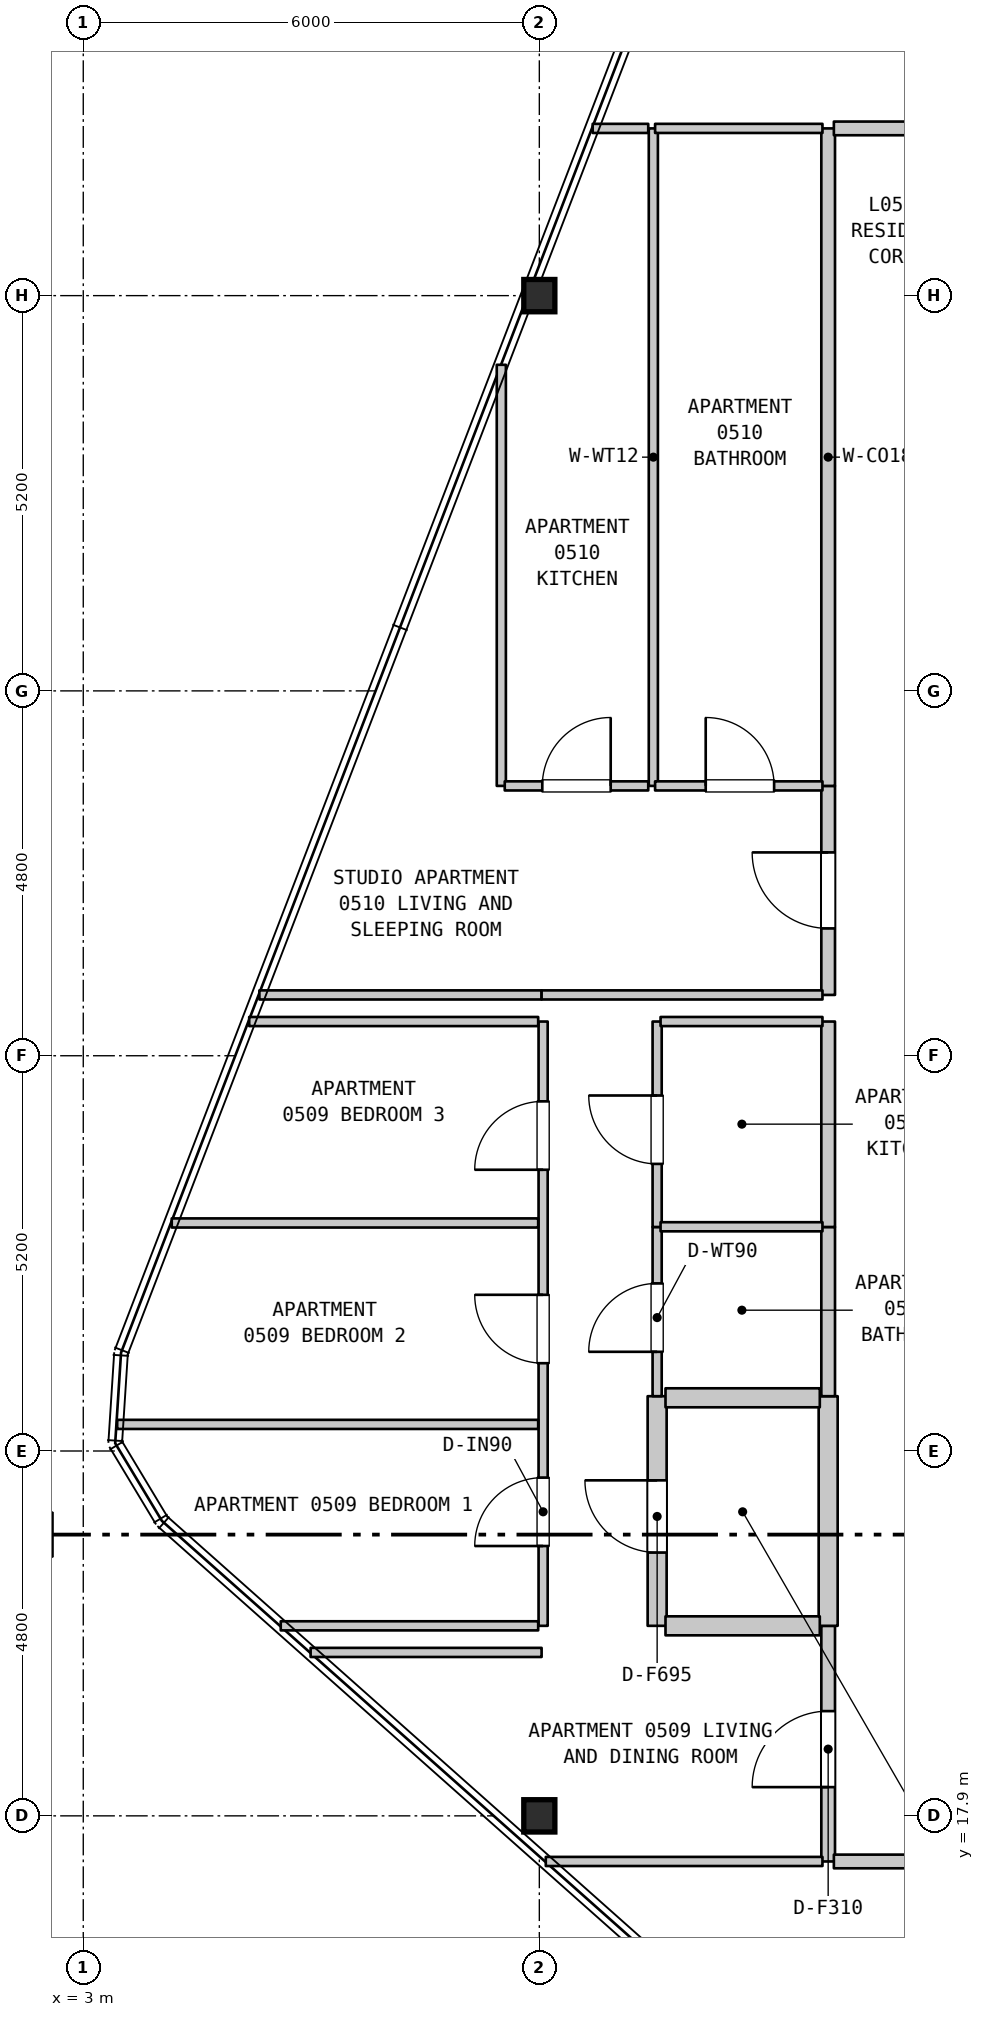
"""IFC4 building model, lengths in metres.
Left out: names, types, materials, properties, quantities, classifications, styles, units other than length and angle.
Written with IfcOpenShell. Run it as: python <this file> out.ifc"""

import sys

from ifc_helpers import new_model, si_unit, direction, frame, frame_2d, origin, origin_2d, place, context, subcontext, project, spatial, rectangle, i_section, extrude, element, fill, save


model = new_model("IFC4")
c1 = context("Model", 3, precision=1e-05, world=origin(), true_north=direction((0.0, 1.0)))
c2 = subcontext(c1, "Body", "Model", "MODEL_VIEW")
j1 = project(units=[si_unit("LENGTHUNIT", "METRE"), si_unit("PLANEANGLEUNIT", "RADIAN")], contexts=[c1])
p1 = place(None, origin())
s1 = spatial("IfcSite", under=j1, at=p1, CompositionType="ELEMENT")
p2 = place(p1, origin())
s2 = spatial("IfcBuilding", under=s1, at=p2, CompositionType="ELEMENT")
p3 = place(p2, frame((0.0, 0.0, 27.7)))
s3 = spatial("IfcBuildingStorey", under=s2, at=p3, CompositionType="ELEMENT", Elevation=27.7)
for number, where, z_axis, x_axis in (
    (1, (9.0, 17.9, 0.0), (0.0, 0.0, 1.0), (1.0, 0.0, 0.0)),
    (2, (9.0, 37.9, 0.0), (0.0, 0.0, 1.0), (1.0, 0.0, 0.0)),
):
    element("IfcColumn", number, at=place(p3, frame(where, z_axis=z_axis, x_axis=x_axis)), inside=s3, PredefinedType="COLUMN", context=c2, shape_type="SweptSolid", body=[
        extrude(i_section(OverallWidth=0.409, OverallDepth=0.425, WebThickness=0.032, FlangeThickness=0.052, FilletRadius=0.015, at=origin_2d()), origin(), (0.0, 0.0, 1.0), 3.7),
    ])
p4 = place(p3, frame((8.5, 31.45, 0.0), z_axis=(0.0, 0.0, 1.0), x_axis=(0.0, 1.0, 0.0)))
e3 = element("IfcWall", 3, at=p4, inside=s3, PredefinedType="PARTITIONING", context=c2, shape_type="SweptSolid", body=[
    extrude(rectangle(XDim=5.54, YDim=0.12, at=frame_2d((2.77, 0.0))), origin(), (0.0, 0.0, 1.0), 3.385),
])
p5 = place(p3, frame((9.05, 20.4, 0.0), z_axis=(0.0, 0.0, 1.0), x_axis=(0.0, 1.0, 0.0)))
e4 = element("IfcWall", 4, at=p5, inside=s3, PredefinedType="PARTITIONING", context=c2, shape_type="SweptSolid", body=[
    extrude(rectangle(XDim=7.95, YDim=0.12, at=frame_2d((3.975, 0.0))), origin(), (0.0, 0.0, 1.0), 2.785),
])
p6 = place(p5, frame((1.05, 0.0, 0.0)))
e5 = element("IfcOpeningElement", 5, at=p6, cuts=e4, PredefinedType="OPENING", context=c2, shape_type="SweptSolid", body=[
    extrude(rectangle(XDim=0.9, YDim=2.15, at=frame_2d((0.45, 1.075))), frame((0.0, 0.07, 0.0), z_axis=(0.0, -1.0, 0.0), x_axis=(1.0, 0.0, 0.0)), (0.0, 0.0, 1.0), 0.14),
])
p7 = place(p5, frame((3.455, 0.0, 0.0)))
e6 = element("IfcOpeningElement", 6, at=p7, cuts=e4, PredefinedType="OPENING", context=c2, shape_type="SweptSolid", body=[
    extrude(rectangle(XDim=0.9, YDim=2.15, at=frame_2d((0.45, 1.075))), frame((0.0, 0.07, 0.0), z_axis=(0.0, -1.0, 0.0), x_axis=(1.0, 0.0, 0.0)), (0.0, 0.0, 1.0), 0.14),
])
p8 = place(p5, frame((6.0, 0.0, 0.0)))
e7 = element("IfcOpeningElement", 7, at=p8, cuts=e4, PredefinedType="OPENING", context=c2, shape_type="SweptSolid", body=[
    extrude(rectangle(XDim=0.9, YDim=2.15, at=frame_2d((0.45, 1.075))), frame((0.0, 0.07, 0.0), z_axis=(0.0, -1.0, 0.0), x_axis=(1.0, 0.0, 0.0)), (0.0, 0.0, 1.0), 0.14),
])
p9 = place(p3, frame((10.5, 31.45, 0.0), z_axis=(0.0, 0.0, 1.0), x_axis=(0.0, 1.0, 0.0)))
e8 = element("IfcWall", 8, at=p9, inside=s3, PredefinedType="PARTITIONING", context=c2, shape_type="SweptSolid", body=[
    extrude(rectangle(XDim=8.65, YDim=0.12, at=frame_2d((4.325, 0.0))), origin(), (0.0, 0.0, 1.0), 3.385),
])
p10 = place(p3, frame((10.55, 20.4, 0.0), z_axis=(0.0, 0.0, 1.0), x_axis=(0.0, 1.0, 0.0)))
e9 = element("IfcWall", 9, at=p10, inside=s3, PredefinedType="STANDARD", context=c2, shape_type="SweptSolid", body=[
    extrude(rectangle(XDim=3.021, YDim=0.25, at=frame_2d((1.51, 0.0))), origin(), (0.0, 0.0, 1.0), 3.385),
])
p11 = place(p10, frame((0.964, 0.0, 0.0)))
e10 = element("IfcOpeningElement", 10, at=p11, cuts=e9, PredefinedType="OPENING", context=c2, shape_type="SweptSolid", body=[
    extrude(rectangle(XDim=0.95, YDim=2.15, at=frame_2d((0.475, 1.075))), frame((0.0, 0.135, 0.0), z_axis=(0.0, -1.0, 0.0), x_axis=(1.0, 0.0, 0.0)), (0.0, 0.0, 1.0), 0.27),
])
p12 = place(p3, frame((10.55, 23.421, 0.0), z_axis=(0.0, 0.0, 1.0), x_axis=(0.0, 1.0, 0.0)))
e11 = element("IfcWall", 11, at=p12, inside=s3, PredefinedType="PARTITIONING", context=c2, shape_type="SweptSolid", body=[
    extrude(rectangle(XDim=2.226, YDim=0.12, at=frame_2d((1.113, 0.0))), origin(), (0.0, 0.0, 1.0), 3.385),
])
p13 = place(p12, frame((0.584, 0.0, 0.0)))
e12 = element("IfcOpeningElement", 12, at=p13, cuts=e11, PredefinedType="OPENING", context=c2, shape_type="SweptSolid", body=[
    extrude(rectangle(XDim=0.9, YDim=2.1, at=frame_2d((0.45, 1.05))), frame((0.0, 0.07, 0.0), z_axis=(0.0, -1.0, 0.0), x_axis=(1.0, 0.0, 0.0)), (0.0, 0.0, 1.0), 0.14),
])
p14 = place(p3, frame((10.55, 25.647, 0.0), z_axis=(0.0, 0.0, 1.0), x_axis=(0.0, 1.0, 0.0)))
e13 = element("IfcWall", 13, at=p14, inside=s3, PredefinedType="PARTITIONING", context=c2, shape_type="SweptSolid", body=[
    extrude(rectangle(XDim=2.703, YDim=0.12, at=frame_2d((1.352, 0.0))), origin(), (0.0, 0.0, 1.0), 3.385),
])
p15 = place(p14, frame((0.83, 0.0, 0.0)))
e14 = element("IfcOpeningElement", 14, at=p15, cuts=e13, PredefinedType="OPENING", context=c2, shape_type="SweptSolid", body=[
    extrude(rectangle(XDim=0.9, YDim=2.15, at=frame_2d((0.45, 1.075))), frame((0.0, 0.07, 0.0), z_axis=(0.0, -1.0, 0.0), x_axis=(1.0, 0.0, 0.0)), (0.0, 0.0, 1.0), 0.14),
])
p16 = place(p3, frame((12.8, 17.3, 0.0), z_axis=(0.0, 0.0, 1.0), x_axis=(0.0, 1.0, 0.0)))
e15 = element("IfcWall", 15, at=p16, inside=s3, PredefinedType="STANDARD", context=c2, shape_type="SweptSolid", body=[
    extrude(rectangle(XDim=3.1, YDim=0.18, at=frame_2d((1.55, 0.0))), origin(), (0.0, 0.0, 1.0), 3.385),
])
p17 = place(p16, frame((0.978, 0.0, 0.0)))
e16 = element("IfcOpeningElement", 16, at=p17, cuts=e15, PredefinedType="OPENING", context=c2, shape_type="SweptSolid", body=[
    extrude(rectangle(XDim=1.0, YDim=2.15, at=frame_2d((0.5, 1.075))), frame((0.0, 0.1, 0.0), z_axis=(0.0, -1.0, 0.0), x_axis=(1.0, 0.0, 0.0)), (0.0, 0.0, 1.0), 0.2),
])
p18 = place(p3, frame((12.8, 20.4, 0.0), z_axis=(0.0, 0.0, 1.0), x_axis=(0.0, 1.0, 0.0)))
e17 = element("IfcWall", 17, at=p18, inside=s3, PredefinedType="STANDARD", context=c2, shape_type="SweptSolid", body=[
    extrude(rectangle(XDim=3.021, YDim=0.25, at=frame_2d((1.51, 0.0))), origin(), (0.0, 0.0, 1.0), 3.385),
])
p19 = place(p3, frame((12.8, 23.421, 0.0), z_axis=(0.0, 0.0, 1.0), x_axis=(0.0, 1.0, 0.0)))
e18 = element("IfcWall", 18, at=p19, inside=s3, PredefinedType="STANDARD", context=c2, shape_type="SweptSolid", body=[
    extrude(rectangle(XDim=2.226, YDim=0.18, at=frame_2d((1.113, 0.0))), origin(), (0.0, 0.0, 1.0), 3.385),
])
p20 = place(p3, frame((12.8, 25.647, 0.0), z_axis=(0.0, 0.0, 1.0), x_axis=(0.0, 1.0, 0.0)))
e19 = element("IfcWall", 19, at=p20, inside=s3, PredefinedType="STANDARD", context=c2, shape_type="SweptSolid", body=[
    extrude(rectangle(XDim=2.703, YDim=0.18, at=frame_2d((1.352, 0.0))), origin(), (0.0, 0.0, 1.0), 3.385),
])
p21 = place(p3, frame((12.8, 28.7, 0.0), z_axis=(0.0, 0.0, 1.0), x_axis=(0.0, 1.0, 0.0)))
e20 = element("IfcWall", 20, at=p21, inside=s3, PredefinedType="STANDARD", context=c2, shape_type="SweptSolid", body=[
    extrude(rectangle(XDim=2.75, YDim=0.18, at=frame_2d((1.375, 0.0))), origin(), (0.0, 0.0, 1.0), 3.385),
])
p22 = place(p21, frame((0.875, 0.0, 0.0)))
e21 = element("IfcOpeningElement", 21, at=p22, cuts=e20, PredefinedType="OPENING", context=c2, shape_type="SweptSolid", body=[
    extrude(rectangle(XDim=1.0, YDim=2.15, at=frame_2d((0.5, 1.075))), frame((0.0, 0.1, 0.0), z_axis=(0.0, -1.0, 0.0), x_axis=(1.0, 0.0, 0.0)), (0.0, 0.0, 1.0), 0.2),
])
p23 = place(p3, frame((12.8, 31.45, 0.0), z_axis=(0.0, 0.0, 1.0), x_axis=(0.0, 1.0, 0.0)))
e22 = element("IfcWall", 22, at=p23, inside=s3, PredefinedType="STANDARD", context=c2, shape_type="SweptSolid", body=[
    extrude(rectangle(XDim=8.65, YDim=0.18, at=frame_2d((4.325, 0.0))), origin(), (0.0, 0.0, 1.0), 3.385),
])
p24 = place(p3, frame((9.085, 17.3, 0.0), z_axis=(0.0, 0.0, 1.0), x_axis=(1.0, 0.0, 0.0)))
e23 = element("IfcWall", 23, at=p24, inside=s3, PredefinedType="PARTITIONING", context=c2, shape_type="SweptSolid", body=[
    extrude(rectangle(XDim=3.64, YDim=0.12, at=frame_2d((1.82, 0.0))), origin(), (0.0, 0.0, 1.0), 3.385),
])
p25 = place(p3, frame((12.875, 17.3, 0.0), z_axis=(0.0, 0.0, 1.0), x_axis=(1.0, 0.0, 0.0)))
e24 = element("IfcWall", 24, at=p25, inside=s3, PredefinedType="STANDARD", context=c2, shape_type="SweptSolid", body=[
    extrude(rectangle(XDim=5.72, YDim=0.18, at=frame_2d((2.86, 0.0))), origin(), (0.0, 0.0, 1.0), 3.385),
])
p26 = place(p25, frame((2.975, 0.0, 0.0)))
e25 = element("IfcOpeningElement", 25, at=p26, cuts=e24, PredefinedType="OPENING", context=c2, shape_type="SweptSolid", body=[
    extrude(rectangle(XDim=1.0, YDim=2.15, at=frame_2d((0.5, 1.075))), frame((0.0, 0.1, 0.0), z_axis=(0.0, -1.0, 0.0), x_axis=(1.0, 0.0, 0.0)), (0.0, 0.0, 1.0), 0.2),
])
p27 = place(p3, frame((5.991, 20.05, 0.0), z_axis=(0.0, 0.0, 1.0), x_axis=(1.0, 0.0, 0.0)))
e26 = element("IfcWall", 26, at=p27, inside=s3, PredefinedType="PARTITIONING", context=c2, shape_type="SweptSolid", body=[
    extrude(rectangle(XDim=3.039, YDim=0.12, at=frame_2d((1.52, 0.0))), origin(), (0.0, 0.0, 1.0), 3.385),
])
p28 = place(p3, frame((5.598, 20.4, 0.0), z_axis=(0.0, 0.0, 1.0), x_axis=(1.0, 0.0, 0.0)))
e27 = element("IfcWall", 27, at=p28, inside=s3, PredefinedType="PARTITIONING", context=c2, shape_type="SweptSolid", body=[
    extrude(rectangle(XDim=3.387, YDim=0.12, at=frame_2d((1.694, 0.0))), origin(), (0.0, 0.0, 1.0), 3.385),
])
p29 = place(p3, frame((10.66, 20.4, 0.0), z_axis=(0.0, 0.0, 1.0), x_axis=(1.0, 0.0, 0.0)))
e28 = element("IfcWall", 28, at=p29, inside=s3, PredefinedType="STANDARD", context=c2, shape_type="SweptSolid", body=[
    extrude(rectangle(XDim=2.03, YDim=0.25, at=frame_2d((1.015, 0.0))), origin(), (0.0, 0.0, 1.0), 3.385),
])
p30 = place(p3, frame((3.446, 23.05, 0.0), z_axis=(0.0, 0.0, 1.0), x_axis=(1.0, 0.0, 0.0)))
e29 = element("IfcWall", 29, at=p30, inside=s3, PredefinedType="PARTITIONING", context=c2, shape_type="SweptSolid", body=[
    extrude(rectangle(XDim=5.539, YDim=0.12, at=frame_2d((2.77, 0.0))), origin(), (0.0, 0.0, 1.0), 3.385),
])
p31 = place(p3, frame((10.66, 23.4, 0.0), z_axis=(0.0, 0.0, 1.0), x_axis=(1.0, 0.0, 0.0)))
e30 = element("IfcWall", 30, at=p31, inside=s3, PredefinedType="STANDARD", context=c2, shape_type="SweptSolid", body=[
    extrude(rectangle(XDim=2.03, YDim=0.25, at=frame_2d((1.015, 0.0))), origin(), (0.0, 0.0, 1.0), 3.385),
])
p32 = place(p3, frame((10.595, 25.65, 0.0), z_axis=(0.0, 0.0, 1.0), x_axis=(1.0, 0.0, 0.0)))
e31 = element("IfcWall", 31, at=p32, inside=s3, PredefinedType="PARTITIONING", context=c2, shape_type="SweptSolid", body=[
    extrude(rectangle(XDim=2.13, YDim=0.12, at=frame_2d((1.065, 0.0))), origin(), (0.0, 0.0, 1.0), 3.385),
])
p33 = place(p3, frame((4.164, 25.7, 0.0), z_axis=(0.0, 0.0, 1.0), x_axis=(1.0, 0.0, 0.0)))
e32 = element("IfcWall", 32, at=p33, inside=s3, PredefinedType="PARTITIONING", context=c2, shape_type="SweptSolid", body=[
    extrude(rectangle(XDim=4.821, YDim=0.12, at=frame_2d((2.411, 0.0))), origin(), (0.0, 0.0, 1.0), 3.385),
])
p34 = place(p3, frame((5.183, 28.35, 0.0), z_axis=(0.0, 0.0, 1.0), x_axis=(1.0, 0.0, 0.0)))
e33 = element("IfcWall", 33, at=p34, inside=s3, PredefinedType="PARTITIONING", context=c2, shape_type="SweptSolid", body=[
    extrude(rectangle(XDim=3.802, YDim=0.12, at=frame_2d((1.901, 0.0))), origin(), (0.0, 0.0, 1.0), 3.385),
])
p35 = place(p3, frame((10.595, 28.35, 0.0), z_axis=(0.0, 0.0, 1.0), x_axis=(1.0, 0.0, 0.0)))
e34 = element("IfcWall", 34, at=p35, inside=s3, PredefinedType="PARTITIONING", context=c2, shape_type="SweptSolid", body=[
    extrude(rectangle(XDim=2.13, YDim=0.12, at=frame_2d((1.065, 0.0))), origin(), (0.0, 0.0, 1.0), 3.385),
])
p36 = place(p3, frame((5.317, 28.7, 0.0), z_axis=(0.0, 0.0, 1.0), x_axis=(1.0, 0.0, 0.0)))
e35 = element("IfcWall", 35, at=p36, inside=s3, PredefinedType="PARTITIONING", context=c2, shape_type="SweptSolid", body=[
    extrude(rectangle(XDim=3.713, YDim=0.12, at=frame_2d((1.856, 0.0))), origin(), (0.0, 0.0, 1.0), 3.385),
])
p37 = place(p3, frame((9.03, 28.7, 0.0), z_axis=(0.0, 0.0, 1.0), x_axis=(1.0, 0.0, 0.0)))
e36 = element("IfcWall", 36, at=p37, inside=s3, PredefinedType="PARTITIONING", context=c2, shape_type="SweptSolid", body=[
    extrude(rectangle(XDim=3.695, YDim=0.12, at=frame_2d((1.848, 0.0))), origin(), (0.0, 0.0, 1.0), 3.385),
])
p38 = place(p3, frame((8.545, 31.45, 0.0), z_axis=(0.0, 0.0, 1.0), x_axis=(1.0, 0.0, 0.0)))
e37 = element("IfcWall", 37, at=p38, inside=s3, PredefinedType="PARTITIONING", context=c2, shape_type="SweptSolid", body=[
    extrude(rectangle(XDim=1.888, YDim=0.12, at=frame_2d((0.944, 0.0))), origin(), (0.0, 0.0, 1.0), 3.385),
])
p39 = place(p38, frame((0.494, 0.0, 0.0)))
e38 = element("IfcOpeningElement", 38, at=p39, cuts=e37, PredefinedType="OPENING", context=c2, shape_type="SweptSolid", body=[
    extrude(rectangle(XDim=0.9, YDim=2.15, at=frame_2d((0.45, 1.075))), frame((0.0, 0.07, 0.0), z_axis=(0.0, -1.0, 0.0), x_axis=(1.0, 0.0, 0.0)), (0.0, 0.0, 1.0), 0.14),
])
p40 = place(p3, frame((10.523, 31.45, 0.0), z_axis=(0.0, 0.0, 1.0), x_axis=(1.0, 0.0, 0.0)))
e39 = element("IfcWall", 39, at=p40, inside=s3, PredefinedType="PARTITIONING", context=c2, shape_type="SweptSolid", body=[
    extrude(rectangle(XDim=2.202, YDim=0.12, at=frame_2d((1.101, 0.0))), origin(), (0.0, 0.0, 1.0), 3.385),
])
p41 = place(p40, frame((0.666, 0.0, 0.0)))
e40 = element("IfcOpeningElement", 40, at=p41, cuts=e39, PredefinedType="OPENING", context=c2, shape_type="SweptSolid", body=[
    extrude(rectangle(XDim=0.9, YDim=2.1, at=frame_2d((0.45, 1.05))), frame((0.0, 0.07, 0.0), z_axis=(0.0, -1.0, 0.0), x_axis=(1.0, 0.0, 0.0)), (0.0, 0.0, 1.0), 0.14),
])
p42 = place(p3, frame((9.702, 40.1, 0.0), z_axis=(0.0, 0.0, 1.0), x_axis=(1.0, 0.0, 0.0)))
e41 = element("IfcWall", 41, at=p42, inside=s3, PredefinedType="PARTITIONING", context=c2, shape_type="SweptSolid", body=[
    extrude(rectangle(XDim=0.731, YDim=0.12, at=frame_2d((0.366, 0.0))), origin(), (0.0, 0.0, 1.0), 3.385),
])
p43 = place(p3, frame((10.523, 40.1, 0.0), z_axis=(0.0, 0.0, 1.0), x_axis=(1.0, 0.0, 0.0)))
e42 = element("IfcWall", 42, at=p43, inside=s3, PredefinedType="PARTITIONING", context=c2, shape_type="SweptSolid", body=[
    extrude(rectangle(XDim=2.202, YDim=0.12, at=frame_2d((1.101, 0.0))), origin(), (0.0, 0.0, 1.0), 3.385),
])
p44 = place(p3, frame((12.875, 40.1, 0.0), z_axis=(0.0, 0.0, 1.0), x_axis=(1.0, 0.0, 0.0)))
e43 = element("IfcWall", 43, at=p44, inside=s3, PredefinedType="STANDARD", context=c2, shape_type="SweptSolid", body=[
    extrude(rectangle(XDim=5.59, YDim=0.18, at=frame_2d((2.795, 0.0))), origin(), (0.0, 0.0, 1.0), 3.385),
])
p45 = place(p44, frame((2.28, 0.0, 0.0)))
e44 = element("IfcOpeningElement", 44, at=p45, cuts=e43, PredefinedType="OPENING", context=c2, shape_type="SweptSolid", body=[
    extrude(rectangle(XDim=1.0, YDim=2.15, at=frame_2d((0.5, 1.075))), frame((0.0, 0.1, 0.0), z_axis=(0.0, -1.0, 0.0), x_axis=(1.0, 0.0, 0.0)), (0.0, 0.0, 1.0), 0.2),
])
p46 = place(p6, origin())
e45 = element("IfcDoor", 45, at=p46, inside=s3, OperationType="SINGLE_SWING_LEFT", PredefinedType="DOOR", context=c2, shape_type="SweptSolid", body=[
    extrude(rectangle(XDim=0.9, YDim=2.15, at=frame_2d((0.45, 1.075))), frame((0.0, 0.025, 0.0), z_axis=(0.0, -1.0, 0.0), x_axis=(1.0, 0.0, 0.0)), (0.0, 0.0, 1.0), 0.05),
])
fill(e5, e45)
p47 = place(p7, origin())
e46 = element("IfcDoor", 46, at=p47, inside=s3, OperationType="SINGLE_SWING_RIGHT", PredefinedType="DOOR", context=c2, shape_type="SweptSolid", body=[
    extrude(rectangle(XDim=0.9, YDim=2.15, at=frame_2d((0.45, 1.075))), frame((0.0, 0.025, 0.0), z_axis=(0.0, -1.0, 0.0), x_axis=(1.0, 0.0, 0.0)), (0.0, 0.0, 1.0), 0.05),
])
fill(e6, e46)
p48 = place(p8, origin())
e47 = element("IfcDoor", 47, at=p48, inside=s3, OperationType="SINGLE_SWING_LEFT", PredefinedType="DOOR", context=c2, shape_type="SweptSolid", body=[
    extrude(rectangle(XDim=0.9, YDim=2.15, at=frame_2d((0.45, 1.075))), frame((0.0, 0.025, 0.0), z_axis=(0.0, -1.0, 0.0), x_axis=(1.0, 0.0, 0.0)), (0.0, 0.0, 1.0), 0.05),
])
fill(e7, e47)
p49 = place(p11, origin())
e48 = element("IfcDoor", 48, at=p49, inside=s3, OperationType="SINGLE_SWING_RIGHT", PredefinedType="DOOR", context=c2, shape_type="SweptSolid", body=[
    extrude(rectangle(XDim=0.95, YDim=2.15, at=frame_2d((0.475, 1.075))), frame((0.0, 0.025, 0.0), z_axis=(0.0, -1.0, 0.0), x_axis=(1.0, 0.0, 0.0)), (0.0, 0.0, 1.0), 0.05),
])
fill(e10, e48)
p50 = place(p13, origin())
e49 = element("IfcDoor", 49, at=p50, inside=s3, OperationType="SINGLE_SWING_LEFT", PredefinedType="DOOR", context=c2, shape_type="SweptSolid", body=[
    extrude(rectangle(XDim=0.9, YDim=2.1, at=frame_2d((0.45, 1.05))), frame((0.0, 0.025, 0.0), z_axis=(0.0, -1.0, 0.0), x_axis=(1.0, 0.0, 0.0)), (0.0, 0.0, 1.0), 0.05),
])
fill(e12, e49)
p51 = place(p15, origin())
e50 = element("IfcDoor", 50, at=p51, inside=s3, OperationType="SINGLE_SWING_RIGHT", PredefinedType="DOOR", context=c2, shape_type="SweptSolid", body=[
    extrude(rectangle(XDim=0.9, YDim=2.15, at=frame_2d((0.45, 1.075))), frame((0.0, 0.025, 0.0), z_axis=(0.0, -1.0, 0.0), x_axis=(1.0, 0.0, 0.0)), (0.0, 0.0, 1.0), 0.05),
])
fill(e14, e50)
p52 = place(p17, origin())
e51 = element("IfcDoor", 51, at=p52, inside=s3, OperationType="SINGLE_SWING_LEFT", PredefinedType="DOOR", context=c2, shape_type="SweptSolid", body=[
    extrude(rectangle(XDim=1.0, YDim=2.15, at=frame_2d((0.5, 1.075))), frame((0.0, 0.025, 0.0), z_axis=(0.0, -1.0, 0.0), x_axis=(1.0, 0.0, 0.0)), (0.0, 0.0, 1.0), 0.05),
])
fill(e16, e51)
p53 = place(p22, origin())
e52 = element("IfcDoor", 52, at=p53, inside=s3, OperationType="SINGLE_SWING_RIGHT", PredefinedType="DOOR", context=c2, shape_type="SweptSolid", body=[
    extrude(rectangle(XDim=1.0, YDim=2.15, at=frame_2d((0.5, 1.075))), frame((0.0, 0.025, 0.0), z_axis=(0.0, -1.0, 0.0), x_axis=(1.0, 0.0, 0.0)), (0.0, 0.0, 1.0), 0.05),
])
fill(e21, e52)
p54 = place(p39, origin())
e53 = element("IfcDoor", 53, at=p54, inside=s3, OperationType="SINGLE_SWING_RIGHT", PredefinedType="DOOR", context=c2, shape_type="SweptSolid", body=[
    extrude(rectangle(XDim=0.9, YDim=2.15, at=frame_2d((0.45, 1.075))), frame((0.0, 0.025, 0.0), z_axis=(0.0, -1.0, 0.0), x_axis=(1.0, 0.0, 0.0)), (0.0, 0.0, 1.0), 0.05),
])
fill(e38, e53)
p55 = place(p41, origin())
e54 = element("IfcDoor", 54, at=p55, inside=s3, OperationType="SINGLE_SWING_LEFT", PredefinedType="DOOR", context=c2, shape_type="SweptSolid", body=[
    extrude(rectangle(XDim=0.9, YDim=2.1, at=frame_2d((0.45, 1.05))), frame((0.0, 0.025, 0.0), z_axis=(0.0, -1.0, 0.0), x_axis=(1.0, 0.0, 0.0)), (0.0, 0.0, 1.0), 0.05),
])
fill(e40, e54)
save(model, sys.argv[1])
